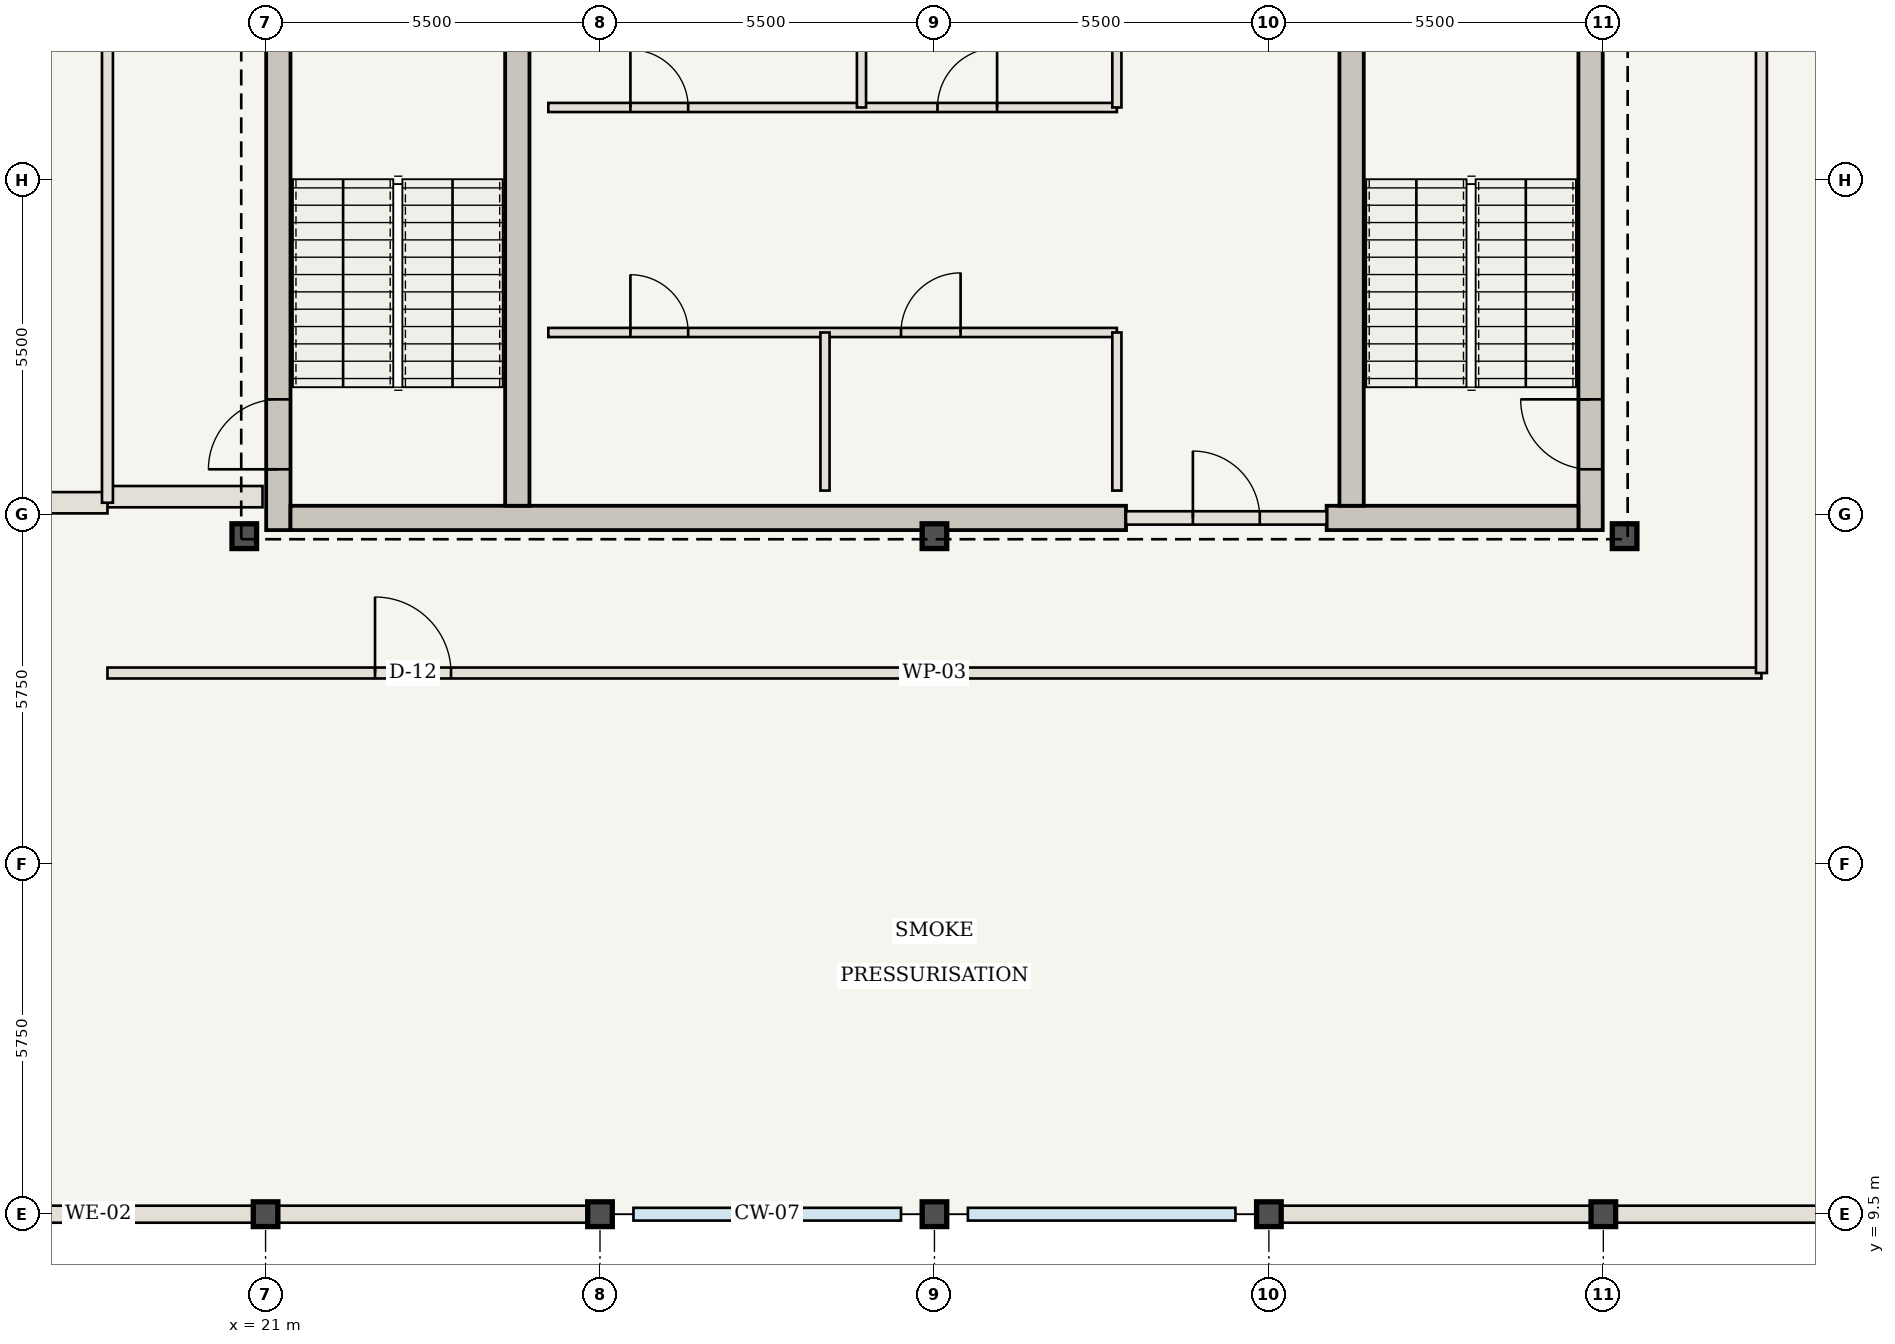
"""IFC4 building model, lengths in metres.
Left out: names, types, materials, properties, quantities, classifications, styles, units other than length and angle.
Written with IfcOpenShell. Run it as: python <this file> out.ifc"""

import sys

from ifc_helpers import new_model, si_unit, direction, frame, frame_2d, origin, origin_2d, place, context, subcontext, project, spatial, rectangle, i_section, extrude, element, fill, save


model = new_model("IFC4")
c1 = context("Model", 3, precision=1e-05, world=origin(), true_north=direction((0.0, 1.0)))
c2 = subcontext(c1, "Body", "Model", "MODEL_VIEW")
j1 = project(units=[si_unit("LENGTHUNIT", "METRE"), si_unit("PLANEANGLEUNIT", "RADIAN")], contexts=[c1])
p1 = place(None, origin())
s1 = spatial("IfcSite", under=j1, at=p1, CompositionType="ELEMENT")
p2 = place(p1, origin())
s2 = spatial("IfcBuilding", under=s1, at=p2, CompositionType="ELEMENT")
p3 = place(p2, frame((0.0, 0.0, 317.8)))
s3 = spatial("IfcBuildingStorey", under=s2, at=p3, CompositionType="ELEMENT", Elevation=317.8)
p4 = place(p3, frame((21.21, 20.75, 0.0), z_axis=(0.0, 0.0, 1.0), x_axis=(0.0, 1.0, 0.0)))
e1 = element("IfcWall", 1, at=p4, inside=s3, PredefinedType="SHEAR", context=c2, shape_type="SweptSolid", body=[
    extrude(rectangle(XDim=9.85, YDim=0.4, at=frame_2d((4.925, 0.0))), origin(), (0.0, 0.0, 1.0), 4.55),
])
p5 = place(p4, frame((1.0, 0.0, 0.0)))
e2 = element("IfcOpeningElement", 2, at=p5, cuts=e1, PredefinedType="OPENING", context=c2, shape_type="SweptSolid", body=[
    extrude(rectangle(XDim=1.15, YDim=2.15, at=frame_2d((0.575, 1.075))), frame((0.0, 0.21, 0.0), z_axis=(0.0, -1.0, 0.0), x_axis=(1.0, 0.0, 0.0)), (0.0, 0.0, 1.0), 0.42),
])
p6 = place(p3, frame((42.79, 20.75, 0.0), z_axis=(0.0, 0.0, 1.0), x_axis=(0.0, 1.0, 0.0)))
e3 = element("IfcWall", 3, at=p6, inside=s3, PredefinedType="SHEAR", context=c2, shape_type="SweptSolid", body=[
    extrude(rectangle(XDim=9.85, YDim=0.4, at=frame_2d((4.925, 0.0))), origin(), (0.0, 0.0, 1.0), 4.55),
])
p7 = place(p6, frame((1.0, 0.0, 0.0)))
e4 = element("IfcOpeningElement", 4, at=p7, cuts=e3, PredefinedType="OPENING", context=c2, shape_type="SweptSolid", body=[
    extrude(rectangle(XDim=1.15, YDim=2.15, at=frame_2d((0.575, 1.075))), frame((0.0, 0.21, 0.0), z_axis=(0.0, -1.0, 0.0), x_axis=(1.0, 0.0, 0.0)), (0.0, 0.0, 1.0), 0.42),
])
p8 = place(p3, frame((21.41, 20.95, 0.0), z_axis=(0.0, 0.0, 1.0), x_axis=(1.0, 0.0, 0.0)))
e5 = element("IfcWall", 5, at=p8, inside=s3, PredefinedType="SHEAR", context=c2, shape_type="SweptSolid", body=[
    extrude(rectangle(XDim=13.74, YDim=0.4, at=frame_2d((6.87, 0.0))), origin(), (0.0, 0.0, 1.0), 4.55),
])
p9 = place(p3, frame((38.45, 20.95, 0.0), z_axis=(0.0, 0.0, 1.0), x_axis=(1.0, 0.0, 0.0)))
e6 = element("IfcWall", 6, at=p9, inside=s3, PredefinedType="SHEAR", context=c2, shape_type="SweptSolid", body=[
    extrude(rectangle(XDim=4.14, YDim=0.4, at=frame_2d((2.07, 0.0))), origin(), (0.0, 0.0, 1.0), 4.55),
])
for number, where, z_axis, x_axis in (
    (7, (25.14, 21.15, 0.0), (0.0, 0.0, 1.0), (0.0, 1.0, 0.0)),
    (8, (38.86, 21.15, 0.0), (0.0, 0.0, 1.0), (0.0, 1.0, 0.0)),
):
    element("IfcWall", number, at=place(p3, frame(where, z_axis=z_axis, x_axis=x_axis)), inside=s3, PredefinedType="SHEAR", context=c2, shape_type="SweptSolid", body=[
        extrude(rectangle(XDim=9.45, YDim=0.4, at=frame_2d((4.725, 0.0))), origin(), (0.0, 0.0, 1.0), 4.55),
    ])
for number, where, z_axis, x_axis in (
    (9, (20.65, 20.65, 0.0), (0.0, 0.0, 1.0), (1.0, 0.0, 0.0)),
    (10, (32.0, 20.65, 0.0), (0.0, 0.0, 1.0), (1.0, 0.0, 0.0)),
    (11, (43.35, 20.65, 0.0), (0.0, 0.0, 1.0), (1.0, 0.0, 0.0)),
    (12, (21.0, 9.5, 0.0), (0.0, 0.0, 1.0), (1.0, 0.0, 0.0)),
    (13, (26.5, 9.5, 0.0), (0.0, 0.0, 1.0), (1.0, 0.0, 0.0)),
    (14, (32.0, 9.5, 0.0), (0.0, 0.0, 1.0), (1.0, 0.0, 0.0)),
    (15, (37.5, 9.5, 0.0), (0.0, 0.0, 1.0), (1.0, 0.0, 0.0)),
    (16, (43.0, 9.5, 0.0), (0.0, 0.0, 1.0), (1.0, 0.0, 0.0)),
):
    element("IfcColumn", number, at=place(p3, frame(where, z_axis=z_axis, x_axis=x_axis)), inside=s3, PredefinedType="COLUMN", context=c2, shape_type="SweptSolid", body=[
        extrude(i_section(OverallWidth=0.404, OverallDepth=0.407, WebThickness=0.027, FlangeThickness=0.044, at=origin_2d()), origin(), (0.0, 0.0, 1.0), 4.55),
    ])
p10 = place(p3, frame((35.15, 20.95, 0.0), z_axis=(0.0, 0.0, 1.0), x_axis=(1.0, 0.0, 0.0)))
e17 = element("IfcWall", 17, at=p10, inside=s3, PredefinedType="STANDARD", context=c2, shape_type="SweptSolid", body=[
    extrude(rectangle(XDim=3.3, YDim=0.22, at=frame_2d((1.65, 0.0))), origin(), (0.0, 0.0, 1.0), 4.29),
])
p11 = place(p10, frame((1.1, 0.0, 0.0)))
e18 = element("IfcOpeningElement", 18, at=p11, cuts=e17, PredefinedType="OPENING", context=c2, shape_type="SweptSolid", body=[
    extrude(rectangle(XDim=1.1, YDim=2.15, at=frame_2d((0.55, 1.075))), frame((0.0, 0.12, 0.0), z_axis=(0.0, -1.0, 0.0), x_axis=(1.0, 0.0, 0.0)), (0.0, 0.0, 1.0), 0.24),
])
p12 = place(p3, frame((25.65, 24.0, 0.0), z_axis=(0.0, 0.0, 1.0), x_axis=(1.0, 0.0, 0.0)))
e19 = element("IfcWall", 19, at=p12, inside=s3, PredefinedType="STANDARD", context=c2, shape_type="SweptSolid", body=[
    extrude(rectangle(XDim=9.35, YDim=0.15, at=frame_2d((4.675, 0.0))), origin(), (0.0, 0.0, 1.0), 4.29),
])
p13 = place(p12, frame((1.35, 0.0, 0.0)))
e20 = element("IfcOpeningElement", 20, at=p13, cuts=e19, PredefinedType="OPENING", context=c2, shape_type="SweptSolid", body=[
    extrude(rectangle(XDim=0.95, YDim=2.15, at=frame_2d((0.475, 1.075))), frame((0.0, 0.085, 0.0), z_axis=(0.0, -1.0, 0.0), x_axis=(1.0, 0.0, 0.0)), (0.0, 0.0, 1.0), 0.17),
])
p14 = place(p12, frame((5.8, 0.0, 0.0)))
e21 = element("IfcOpeningElement", 21, at=p14, cuts=e19, PredefinedType="OPENING", context=c2, shape_type="SweptSolid", body=[
    extrude(rectangle(XDim=0.98, YDim=2.2, at=frame_2d((0.49, 1.1))), frame((0.0, 0.085, 0.0), z_axis=(0.0, -1.0, 0.0), x_axis=(1.0, 0.0, 0.0)), (0.0, 0.0, 1.0), 0.17),
])
for number, where, z_axis, x_axis in (
    (22, (30.2, 21.4, 0.0), (0.0, 0.0, 1.0), (0.0, 1.0, 0.0)),
    (23, (35.0, 21.4, 0.0), (0.0, 0.0, 1.0), (0.0, 1.0, 0.0)),
):
    element("IfcWall", number, at=place(p3, frame(where, z_axis=z_axis, x_axis=x_axis)), inside=s3, PredefinedType="STANDARD", context=c2, shape_type="SweptSolid", body=[
        extrude(rectangle(XDim=2.6, YDim=0.15, at=frame_2d((1.3, 0.0))), origin(), (0.0, 0.0, 1.0), 4.29),
    ])
p15 = place(p3, frame((25.65, 27.7, 0.0), z_axis=(0.0, 0.0, 1.0), x_axis=(1.0, 0.0, 0.0)))
e24 = element("IfcWall", 24, at=p15, inside=s3, PredefinedType="STANDARD", context=c2, shape_type="SweptSolid", body=[
    extrude(rectangle(XDim=9.35, YDim=0.15, at=frame_2d((4.675, 0.0))), origin(), (0.0, 0.0, 1.0), 4.29),
])
p16 = place(p15, frame((1.35, 0.0, 0.0)))
e25 = element("IfcOpeningElement", 25, at=p16, cuts=e24, PredefinedType="OPENING", context=c2, shape_type="SweptSolid", body=[
    extrude(rectangle(XDim=0.95, YDim=2.15, at=frame_2d((0.475, 1.075))), frame((0.0, 0.085, 0.0), z_axis=(0.0, -1.0, 0.0), x_axis=(1.0, 0.0, 0.0)), (0.0, 0.0, 1.0), 0.17),
])
p17 = place(p15, frame((6.4, 0.0, 0.0)))
e26 = element("IfcOpeningElement", 26, at=p17, cuts=e24, PredefinedType="OPENING", context=c2, shape_type="SweptSolid", body=[
    extrude(rectangle(XDim=0.98, YDim=2.2, at=frame_2d((0.49, 1.1))), frame((0.0, 0.085, 0.0), z_axis=(0.0, -1.0, 0.0), x_axis=(1.0, 0.0, 0.0)), (0.0, 0.0, 1.0), 0.17),
])
for number, where, z_axis, x_axis in (
    (27, (30.8, 27.7, 0.0), (0.0, 0.0, 1.0), (0.0, 1.0, 0.0)),
    (28, (35.0, 27.7, 0.0), (0.0, 0.0, 1.0), (0.0, 1.0, 0.0)),
):
    element("IfcWall", number, at=place(p3, frame(where, z_axis=z_axis, x_axis=x_axis)), inside=s3, PredefinedType="STANDARD", context=c2, shape_type="SweptSolid", body=[
        extrude(rectangle(XDim=2.75, YDim=0.15, at=frame_2d((1.375, 0.0))), origin(), (0.0, 0.0, 1.0), 4.29),
    ])
p18 = place(p3, frame((18.4, 21.3, 0.0), z_axis=(0.0, 0.0, 1.0), x_axis=(1.0, 0.0, 0.0)))
e29 = element("IfcWall", 29, at=p18, inside=s3, PredefinedType="STANDARD", context=c2, shape_type="SweptSolid", body=[
    extrude(rectangle(XDim=2.55, YDim=0.35, at=frame_2d((1.275, 0.0))), origin(), (0.0, 0.0, 1.0), 4.29),
])
p19 = place(p3, frame((18.4, 18.4, 0.0), z_axis=(0.0, 0.0, 1.0), x_axis=(1.0, 0.0, 0.0)))
e30 = element("IfcWall", 30, at=p19, inside=s3, PredefinedType="STANDARD", context=c2, shape_type="SweptSolid", body=[
    extrude(rectangle(XDim=27.2, YDim=0.18, at=frame_2d((13.6, 0.0))), origin(), (0.0, 0.0, 1.0), 4.29),
])
p20 = place(p19, frame((4.4, 0.0, 0.0)))
e31 = element("IfcOpeningElement", 31, at=p20, cuts=e30, PredefinedType="OPENING", context=c2, shape_type="SweptSolid", body=[
    extrude(rectangle(XDim=1.25, YDim=2.2, at=frame_2d((0.625, 1.1))), frame((0.0, 0.1, 0.0), z_axis=(0.0, -1.0, 0.0), x_axis=(1.0, 0.0, 0.0)), (0.0, 0.0, 1.0), 0.2),
])
p21 = place(p3, frame((9.56, 21.2, 0.0), z_axis=(0.0, 0.0, 1.0), x_axis=(1.0, 0.0, 0.0)))
e32 = element("IfcWall", 32, at=p21, inside=s3, PredefinedType="STANDARD", context=c2, shape_type="SweptSolid", body=[
    extrude(rectangle(XDim=8.84, YDim=0.35, at=frame_2d((4.42, 0.0))), origin(), (0.0, 0.0, 1.0), 4.29),
])
p22 = place(p3, frame((18.4, 21.2, 0.0), z_axis=(0.0, 0.0, 1.0), x_axis=(0.0, 1.0, 0.0)))
e33 = element("IfcWall", 33, at=p22, inside=s3, PredefinedType="STANDARD", context=c2, shape_type="SweptSolid", body=[
    extrude(rectangle(XDim=21.6, YDim=0.18, at=frame_2d((10.8, 0.0))), origin(), (0.0, 0.0, 1.0), 4.29),
])
p23 = place(p22, frame((11.75, 0.0, 0.0)))
e34 = element("IfcOpeningElement", 34, at=p23, cuts=e33, PredefinedType="OPENING", context=c2, shape_type="SweptSolid", body=[
    extrude(rectangle(XDim=1.1, YDim=2.15, at=frame_2d((0.55, 1.075))), frame((0.0, 0.1, 0.0), z_axis=(0.0, -1.0, 0.0), x_axis=(1.0, 0.0, 0.0)), (0.0, 0.0, 1.0), 0.2),
])
p24 = place(p3, frame((45.6, 18.4, 0.0), z_axis=(0.0, 0.0, 1.0), x_axis=(0.0, 1.0, 0.0)))
e35 = element("IfcWall", 35, at=p24, inside=s3, PredefinedType="STANDARD", context=c2, shape_type="SweptSolid", body=[
    extrude(rectangle(XDim=27.2, YDim=0.18, at=frame_2d((13.6, 0.0))), origin(), (0.0, 0.0, 1.0), 4.29),
])
p25 = place(p24, frame((14.55, 0.0, 0.0)))
e36 = element("IfcOpeningElement", 36, at=p25, cuts=e35, PredefinedType="OPENING", context=c2, shape_type="SweptSolid", body=[
    extrude(rectangle(XDim=1.25, YDim=2.2, at=frame_2d((0.625, 1.1))), frame((0.0, 0.1, 0.0), z_axis=(0.0, -1.0, 0.0), x_axis=(1.0, 0.0, 0.0)), (0.0, 0.0, 1.0), 0.2),
])
for number, where, z_axis, x_axis in (
    (37, (21.0, 9.5, 0.0), (0.0, 0.0, 1.0), (-1.0, 0.0, 0.0)),
    (38, (26.5, 9.5, 0.0), (0.0, 0.0, 1.0), (-1.0, 0.0, 0.0)),
    (39, (43.0, 9.5, 0.0), (0.0, 0.0, 1.0), (-1.0, 0.0, 0.0)),
    (40, (48.5, 9.5, 0.0), (0.0, 0.0, 1.0), (-1.0, 0.0, 0.0)),
):
    element("IfcWall", number, at=place(p3, frame(where, z_axis=z_axis, x_axis=x_axis)), inside=s3, PredefinedType="USERDEFINED", context=c2, shape_type="SweptSolid", body=[
        extrude(rectangle(XDim=5.5, YDim=0.28, at=frame_2d((2.75, 0.0))), origin(), (0.0, 0.0, 1.0), 3.57),
    ])
p26 = place(p5, origin())
e41 = element("IfcDoor", 41, at=p26, inside=s3, OperationType="SINGLE_SWING_LEFT", PredefinedType="DOOR", context=c2, shape_type="SweptSolid", body=[
    extrude(rectangle(XDim=1.15, YDim=2.15, at=frame_2d((0.575, 1.075))), frame((0.0, 0.025, 0.0), z_axis=(0.0, -1.0, 0.0), x_axis=(1.0, 0.0, 0.0)), (0.0, 0.0, 1.0), 0.05),
])
fill(e2, e41)
p27 = place(p7, origin())
e42 = element("IfcDoor", 42, at=p27, inside=s3, OperationType="SINGLE_SWING_RIGHT", PredefinedType="DOOR", context=c2, shape_type="SweptSolid", body=[
    extrude(rectangle(XDim=1.15, YDim=2.15, at=frame_2d((0.575, 1.075))), frame((0.0, 0.025, 0.0), z_axis=(0.0, -1.0, 0.0), x_axis=(1.0, 0.0, 0.0)), (0.0, 0.0, 1.0), 0.05),
])
fill(e4, e42)
p28 = place(p11, origin())
e43 = element("IfcDoor", 43, at=p28, inside=s3, OperationType="SINGLE_SWING_LEFT", PredefinedType="DOOR", context=c2, shape_type="SweptSolid", body=[
    extrude(rectangle(XDim=1.1, YDim=2.15, at=frame_2d((0.55, 1.075))), frame((0.0, 0.025, 0.0), z_axis=(0.0, -1.0, 0.0), x_axis=(1.0, 0.0, 0.0)), (0.0, 0.0, 1.0), 0.05),
])
fill(e18, e43)
p29 = place(p13, origin())
e44 = element("IfcDoor", 44, at=p29, inside=s3, OperationType="SINGLE_SWING_LEFT", PredefinedType="DOOR", context=c2, shape_type="SweptSolid", body=[
    extrude(rectangle(XDim=0.95, YDim=2.15, at=frame_2d((0.475, 1.075))), frame((0.0, 0.025, 0.0), z_axis=(0.0, -1.0, 0.0), x_axis=(1.0, 0.0, 0.0)), (0.0, 0.0, 1.0), 0.05),
])
fill(e20, e44)
p30 = place(p14, origin())
e45 = element("IfcDoor", 45, at=p30, inside=s3, OperationType="SINGLE_SWING_RIGHT", PredefinedType="DOOR", context=c2, shape_type="SweptSolid", body=[
    extrude(rectangle(XDim=0.98, YDim=2.2, at=frame_2d((0.49, 1.1))), frame((0.0, 0.025, 0.0), z_axis=(0.0, -1.0, 0.0), x_axis=(1.0, 0.0, 0.0)), (0.0, 0.0, 1.0), 0.05),
])
fill(e21, e45)
p31 = place(p16, origin())
e46 = element("IfcDoor", 46, at=p31, inside=s3, OperationType="SINGLE_SWING_LEFT", PredefinedType="DOOR", context=c2, shape_type="SweptSolid", body=[
    extrude(rectangle(XDim=0.95, YDim=2.15, at=frame_2d((0.475, 1.075))), frame((0.0, 0.025, 0.0), z_axis=(0.0, -1.0, 0.0), x_axis=(1.0, 0.0, 0.0)), (0.0, 0.0, 1.0), 0.05),
])
fill(e25, e46)
p32 = place(p17, origin())
e47 = element("IfcDoor", 47, at=p32, inside=s3, OperationType="SINGLE_SWING_RIGHT", PredefinedType="DOOR", context=c2, shape_type="SweptSolid", body=[
    extrude(rectangle(XDim=0.98, YDim=2.2, at=frame_2d((0.49, 1.1))), frame((0.0, 0.025, 0.0), z_axis=(0.0, -1.0, 0.0), x_axis=(1.0, 0.0, 0.0)), (0.0, 0.0, 1.0), 0.05),
])
fill(e26, e47)
p33 = place(p20, origin())
e48 = element("IfcDoor", 48, at=p33, inside=s3, OperationType="SINGLE_SWING_LEFT", PredefinedType="DOOR", context=c2, shape_type="SweptSolid", body=[
    extrude(rectangle(XDim=1.25, YDim=2.2, at=frame_2d((0.625, 1.1))), frame((0.0, 0.025, 0.0), z_axis=(0.0, -1.0, 0.0), x_axis=(1.0, 0.0, 0.0)), (0.0, 0.0, 1.0), 0.05),
])
fill(e31, e48)
save(model, sys.argv[1])
